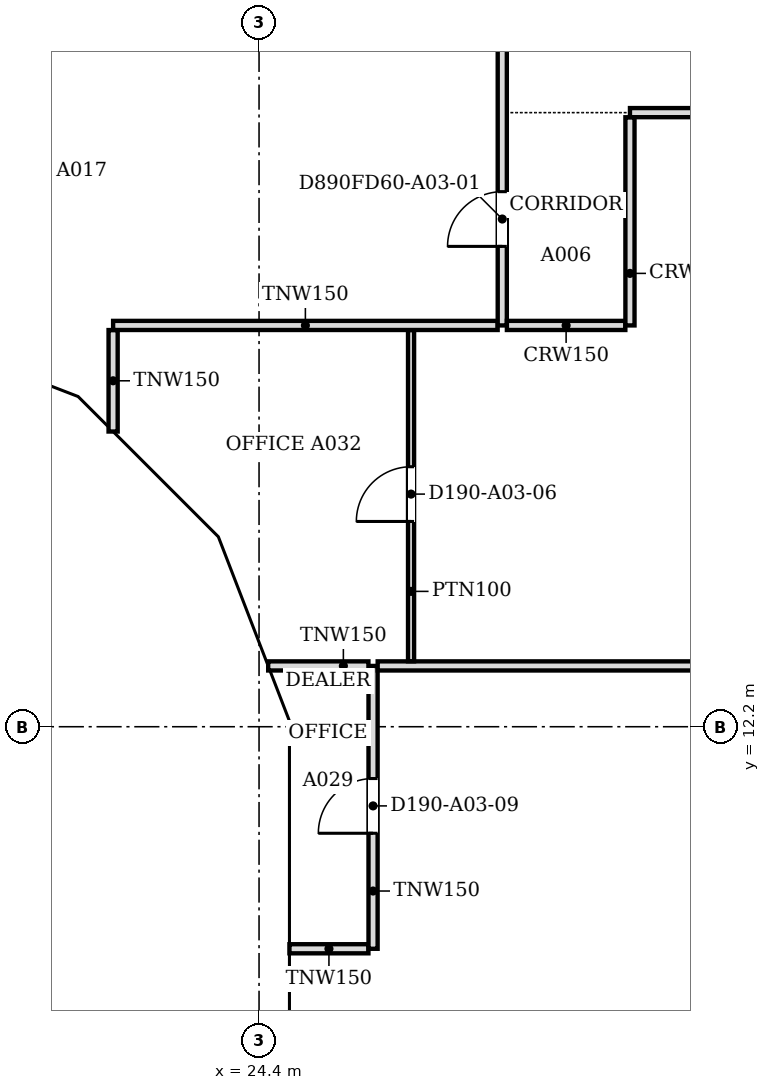
"""IFC4 building model, lengths in metres.
Left out: names, types, materials, properties, quantities, classifications, styles, units other than length and angle.
Written with IfcOpenShell. Run it as: python <this file> out.ifc"""

import sys

from ifc_helpers import new_model, si_unit, direction, frame, frame_2d, origin, place, context, subcontext, project, spatial, polyline, rectangle, outline, extrude, faceted_brep, source, transform, mapped, element, fill, save


model = new_model("IFC4")
c1 = context("Model", 3, precision=1e-05, world=origin(), true_north=direction((0.0, 1.0)))
c2 = subcontext(c1, "Body", "Model", "MODEL_VIEW")
j1 = project(units=[si_unit("LENGTHUNIT", "METRE"), si_unit("PLANEANGLEUNIT", "RADIAN")], contexts=[c1])
p1 = place(None, origin())
s1 = spatial("IfcSite", under=j1, at=p1, CompositionType="ELEMENT")
p2 = place(p1, origin())
s2 = spatial("IfcBuilding", under=s1, at=p2, CompositionType="ELEMENT")
p3 = place(p2, frame((0.0, 0.0, 41.0)))
s3 = spatial("IfcBuildingStorey", under=s2, at=p3, CompositionType="ELEMENT", Elevation=41.0)
m1 = source(origin(), c2, "Body", "Brep", [
    faceted_brep([(0.093, -0.25, 0.056), (3.143, -0.25, 3.736), (3.143, -0.25, 3.864), (0.093, -0.25, 7.544), (0.0, 0.25, 7.543), (0.047, 0.25, 7.6), (3.196, 0.25, 3.8), (0.047, 0.25, 0.0), (0.0, 0.25, 0.057), (3.196, -0.0, 3.8), (0.047, 0.0, 0.0), (0.047, 0.0, 7.6)], [[[0, 1, 2, 3]], [[4, 5, 6, 7, 8]], [[7, 6, 9, 1, 0, 10]], [[6, 5, 11, 3, 2, 9]], [[5, 4, 11]], [[8, 7, 10]], [[8, 10, 0, 3, 11, 4]], [[1, 9, 2]]]),
])
p4 = place(p3, frame((18.303, 18.567, -3.8), z_axis=(0.0, 0.0, 1.0), x_axis=(0.932978940178, -0.359930961693, 0.0)))
e1 = element("IfcWall", 1, at=p4, inside=s3, PredefinedType="SOLIDWALL", context=c2, shape_type="MappedRepresentation", body=[
    mapped(m1, transform((0.0, 0.0, 0.0), scale=1.0)),
])
m2 = source(origin(), c2, "Body", "SweptSolid", [
    extrude(outline(polyline([(0.247, 0.633), (2.871, 3.8), (0.247, 6.967), (0.247, 0.633)])), frame((0.0, 0.26, 0.0), z_axis=(0.0, -1.0, 0.0), x_axis=(1.0, 0.0, 0.0)), (0.0, 0.0, 1.0), 0.52),
])
p5 = place(p4, origin())
e2 = element("IfcOpeningElement", 2, at=p5, cuts=e1, PredefinedType="OPENING", context=c2, shape_type="MappedRepresentation", body=[
    mapped(m2, transform((0.0, 0.0, 0.0), scale=1.0)),
])
m3 = source(origin(), c2, "Body", "Brep", [
    faceted_brep([(3.103, -0.25, 7.536), (0.053, -0.25, 3.864), (0.053, -0.25, 3.736), (3.103, -0.25, 0.064), (0.0, 0.25, 3.8), (3.156, 0.25, 7.6), (3.209, 0.25, 7.536), (3.209, 0.25, 0.064), (3.156, 0.25, 0.0), (3.156, -0.0, 0.0), (3.156, -0.0, 7.6), (0.0, 0.0, 3.8)], [[[0, 1, 2, 3]], [[4, 5, 6, 7, 8]], [[8, 7, 9]], [[6, 5, 10]], [[5, 4, 11, 1, 0, 10]], [[4, 8, 9, 3, 2, 11]], [[11, 2, 1]], [[3, 9, 7, 6, 10, 0]]]),
])
p6 = place(p3, frame((21.285, 17.417, -3.8), z_axis=(0.0, 0.0, 1.0), x_axis=(0.707106781187, -0.707106781187, 0.0)))
e3 = element("IfcWall", 3, at=p6, inside=s3, PredefinedType="SOLIDWALL", context=c2, shape_type="MappedRepresentation", body=[
    mapped(m3, transform((0.0, 0.0, 0.0), scale=1.0)),
])
m4 = source(origin(), c2, "Body", "SweptSolid", [
    extrude(outline(polyline([(2.956, 6.968), (0.325, 3.8), (2.956, 0.632), (2.956, 6.968)])), frame((0.0, 0.26, 0.0), z_axis=(0.0, -1.0, 0.0), x_axis=(1.0, 0.0, 0.0)), (0.0, 0.0, 1.0), 0.52),
])
p7 = place(p6, origin())
e4 = element("IfcOpeningElement", 4, at=p7, cuts=e3, PredefinedType="OPENING", context=c2, shape_type="MappedRepresentation", body=[
    mapped(m4, transform((0.0, 0.0, 0.0), scale=1.0)),
])
m5 = source(origin(), c2, "Body", "Brep", [
    faceted_brep([(0.106, -0.25, 0.064), (3.156, -0.25, 3.744), (3.156, -0.25, 3.856), (0.106, -0.25, 7.536), (0.0, 0.25, 7.536), (0.053, 0.25, 7.6), (3.202, 0.25, 3.8), (0.053, 0.25, 0.0), (0.0, 0.25, 0.064), (3.202, -0.0, 3.8), (0.053, 0.0, 0.0), (0.053, 0.0, 7.6)], [[[0, 1, 2, 3]], [[4, 5, 6, 7, 8]], [[7, 6, 9, 1, 0, 10]], [[6, 5, 11, 3, 2, 9]], [[5, 4, 11]], [[8, 7, 10]], [[8, 10, 0, 3, 11, 4]], [[1, 9, 2]]]),
])
p8 = place(p3, frame((23.497, 15.234, -3.8), z_axis=(0.0, 0.0, 1.0), x_axis=(0.359913782069, -0.932985567668, 0.0)))
e5 = element("IfcWall", 5, at=p8, inside=s3, PredefinedType="SOLIDWALL", context=c2, shape_type="MappedRepresentation", body=[
    mapped(m5, transform((0.0, 0.0, 0.0), scale=1.0)),
])
m6 = source(origin(), c2, "Body", "SweptSolid", [
    extrude(outline(polyline([(0.253, 0.633), (2.878, 3.8), (0.253, 6.967), (0.253, 0.633)])), frame((0.0, 0.26, 0.0), z_axis=(0.0, -1.0, 0.0), x_axis=(1.0, 0.0, 0.0)), (0.0, 0.0, 1.0), 0.52),
])
p9 = place(p8, origin())
e6 = element("IfcOpeningElement", 6, at=p9, cuts=e5, PredefinedType="OPENING", context=c2, shape_type="MappedRepresentation", body=[
    mapped(m6, transform((0.0, 0.0, 0.0), scale=1.0)),
])
m7 = source(origin(), c2, "Body", "Brep", [
    faceted_brep([(3.096, -0.25, 0.0), (6.1, -0.25, 3.8), (3.096, -0.25, 7.6), (0.047, -0.25, 3.857), (0.047, -0.25, 3.743), (0.0, 0.25, 3.8), (3.096, 0.25, 7.6), (6.053, 0.25, 3.859), (6.053, 0.25, 3.741), (3.096, 0.25, 0.0), (6.1, -0.0, 3.8), (0.0, 0.0, 3.8)], [[[0, 1, 2, 3, 4]], [[5, 6, 7, 8, 9]], [[9, 8, 10, 1, 0]], [[7, 6, 2, 1, 10]], [[6, 5, 11, 3, 2]], [[5, 9, 0, 4, 11]], [[11, 4, 3]], [[10, 8, 7]]]),
])
p10 = place(p3, frame((24.65, 12.247, -3.8), z_axis=(0.0, 0.0, 1.0), x_axis=(0.0, -1.0, 0.0)))
e7 = element("IfcWall", 7, at=p10, inside=s3, PredefinedType="SOLIDWALL", context=c2, shape_type="MappedRepresentation", body=[
    mapped(m7, transform((0.0, 0.0, 0.0), scale=1.0)),
])
m8 = source(origin(), c2, "Body", "SweptSolid", [
    extrude(outline(polyline([(3.094, 0.399), (5.781, 3.8), (3.094, 7.201), (0.323, 3.8), (3.094, 0.399)])), frame((0.0, 0.26, 0.0), z_axis=(0.0, -1.0, 0.0), x_axis=(1.0, 0.0, 0.0)), (0.0, 0.0, 1.0), 0.52),
])
p11 = place(p10, origin())
e8 = element("IfcOpeningElement", 8, at=p11, cuts=e7, PredefinedType="OPENING", context=c2, shape_type="MappedRepresentation", body=[
    mapped(m8, transform((0.0, 0.0, 0.0), scale=1.0)),
])
p12 = place(p2, frame((0.0, 0.0, 44.8)))
s4 = spatial("IfcBuildingStorey", under=s2, at=p12, CompositionType="ELEMENT", Elevation=44.8)
m9 = source(origin(), c2, "Body", "Brep", [
    faceted_brep([(3.096, -0.25, 7.536), (0.047, -0.25, 3.856), (0.047, -0.25, 3.744), (3.096, -0.25, 0.064), (0.0, 0.25, 3.8), (3.149, 0.25, 7.6), (3.202, 0.25, 7.536), (3.202, 0.25, 0.064), (3.149, 0.25, 0.0), (3.149, -0.0, 0.0), (3.149, -0.0, 7.6), (0.0, 0.0, 3.8)], [[[0, 1, 2, 3]], [[4, 5, 6, 7, 8]], [[8, 7, 9]], [[6, 5, 10]], [[5, 4, 11, 1, 0, 10]], [[4, 8, 9, 3, 2, 11]], [[11, 2, 1]], [[3, 9, 7, 6, 10, 0]]]),
])
p13 = place(p12, frame((18.346, 18.55, -3.8), z_axis=(0.0, 0.0, 1.0), x_axis=(0.932985567668, -0.359913782069, 0.0)))
e9 = element("IfcWall", 9, at=p13, inside=s4, PredefinedType="SOLIDWALL", context=c2, shape_type="MappedRepresentation", body=[
    mapped(m9, transform((0.0, 0.0, 0.0), scale=1.0)),
])
m10 = source(origin(), c2, "Body", "SweptSolid", [
    extrude(outline(polyline([(2.949, 6.967), (0.325, 3.8), (2.949, 0.633), (2.949, 6.967)])), frame((0.0, 0.26, 0.0), z_axis=(0.0, -1.0, 0.0), x_axis=(1.0, 0.0, 0.0)), (0.0, 0.0, 1.0), 0.52),
])
p14 = place(p13, origin())
e10 = element("IfcOpeningElement", 10, at=p14, cuts=e9, PredefinedType="OPENING", context=c2, shape_type="MappedRepresentation", body=[
    mapped(m10, transform((0.0, 0.0, 0.0), scale=1.0)),
])
m11 = source(origin(), c2, "Body", "Brep", [
    faceted_brep([(0.106, -0.25, 0.064), (3.156, -0.25, 3.736), (3.156, -0.25, 3.864), (0.106, -0.25, 7.536), (0.0, 0.25, 7.536), (0.053, 0.25, 7.6), (3.209, 0.25, 3.8), (0.053, 0.25, 0.0), (0.0, 0.25, 0.064), (3.209, -0.0, 3.8), (0.053, 0.0, 0.0), (0.053, 0.0, 7.6)], [[[0, 1, 2, 3]], [[4, 5, 6, 7, 8]], [[7, 6, 9, 1, 0, 10]], [[6, 5, 11, 3, 2, 9]], [[5, 4, 11]], [[8, 7, 10]], [[8, 10, 0, 3, 11, 4]], [[1, 9, 2]]]),
])
p15 = place(p12, frame((21.248, 17.454, -3.8), z_axis=(0.0, 0.0, 1.0), x_axis=(0.707106781187, -0.707106781187, 0.0)))
e11 = element("IfcWall", 11, at=p15, inside=s4, PredefinedType="SOLIDWALL", context=c2, shape_type="MappedRepresentation", body=[
    mapped(m11, transform((0.0, 0.0, 0.0), scale=1.0)),
])
m12 = source(origin(), c2, "Body", "SweptSolid", [
    extrude(outline(polyline([(0.253, 0.632), (2.884, 3.8), (0.253, 6.968), (0.253, 0.632)])), frame((0.0, 0.26, 0.0), z_axis=(0.0, -1.0, 0.0), x_axis=(1.0, 0.0, 0.0)), (0.0, 0.0, 1.0), 0.52),
])
p16 = place(p15, origin())
e12 = element("IfcOpeningElement", 12, at=p16, cuts=e11, PredefinedType="OPENING", context=c2, shape_type="MappedRepresentation", body=[
    mapped(m12, transform((0.0, 0.0, 0.0), scale=1.0)),
])
m13 = source(origin(), c2, "Body", "Brep", [
    faceted_brep([(3.103, -0.25, 7.544), (0.053, -0.25, 3.864), (0.053, -0.25, 3.736), (3.103, -0.25, 0.056), (0.0, 0.25, 3.8), (3.149, 0.25, 7.6), (3.196, 0.25, 7.543), (3.196, 0.25, 0.057), (3.149, 0.25, 0.0), (3.149, -0.0, 0.0), (3.149, -0.0, 7.6), (0.0, 0.0, 3.8)], [[[0, 1, 2, 3]], [[4, 5, 6, 7, 8]], [[8, 7, 9]], [[6, 5, 10]], [[5, 4, 11, 1, 0, 10]], [[4, 8, 9, 3, 2, 11]], [[11, 2, 1]], [[3, 9, 7, 6, 10, 0]]]),
])
p17 = place(p12, frame((23.517, 15.185, -3.8), z_axis=(0.0, 0.0, 1.0), x_axis=(0.359864468756, -0.933004589553, 0.0)))
e13 = element("IfcWall", 13, at=p17, inside=s4, PredefinedType="SOLIDWALL", context=c2, shape_type="MappedRepresentation", body=[
    mapped(m13, transform((0.0, 0.0, 0.0), scale=1.0)),
])
p18 = place(p17, origin())
e14 = element("IfcOpeningElement", 14, at=p18, cuts=e13, PredefinedType="OPENING", context=c2, shape_type="MappedRepresentation", body=[
    mapped(m10, transform((0.0, 0.0, 0.0), scale=1.0)),
])
m14 = source(origin(), c2, "Body", "Brep", [
    faceted_brep([(0.093, -0.25, 0.057), (3.143, -0.25, 3.8), (0.093, -0.25, 7.543), (0.0, 0.25, 7.544), (0.047, 0.25, 7.6), (3.143, 0.25, 3.8), (0.047, 0.25, 0.0), (0.0, 0.25, 0.056), (0.047, 0.0, 0.0), (0.047, 0.0, 7.6)], [[[0, 1, 2]], [[3, 4, 5, 6, 7]], [[6, 5, 1, 0, 8]], [[5, 4, 9, 2, 1]], [[4, 3, 9]], [[7, 6, 8]], [[7, 8, 0, 2, 9, 3]]]),
])
p19 = place(p12, frame((24.65, 12.293, -3.8), z_axis=(0.0, 0.0, 1.0), x_axis=(0.0, -1.0, 0.0)))
e15 = element("IfcWall", 15, at=p19, inside=s4, PredefinedType="SOLIDWALL", context=c2, shape_type="MappedRepresentation", body=[
    mapped(m14, transform((0.0, 0.0, 0.0), scale=1.0)),
])
m15 = source(origin(), c2, "Body", "SweptSolid", [
    extrude(outline(polyline([(0.247, 0.641), (2.821, 3.8), (0.247, 6.959), (0.247, 0.641)])), frame((0.0, 0.26, 0.0), z_axis=(0.0, -1.0, 0.0), x_axis=(1.0, 0.0, 0.0)), (0.0, 0.0, 1.0), 0.52),
])
p20 = place(p19, origin())
e16 = element("IfcOpeningElement", 16, at=p20, cuts=e15, PredefinedType="OPENING", context=c2, shape_type="MappedRepresentation", body=[
    mapped(m15, transform((0.0, 0.0, 0.0), scale=1.0)),
])
m16 = source(origin(), c2, "Body", "Brep", [
    faceted_brep([(3.003, -0.25, 0.0), (3.05, -0.25, 0.06), (3.05, -0.25, 7.54), (3.003, -0.25, 7.6), (0.0, -0.25, 3.8), (0.0, 0.25, 3.8), (2.957, 0.25, 7.541), (2.957, 0.25, 0.059), (3.003, 0.0, 0.0), (3.003, 0.0, 7.6)], [[[0, 1, 2, 3, 4]], [[5, 6, 7]], [[1, 0, 8]], [[9, 3, 2]], [[6, 5, 4, 3, 9]], [[5, 7, 8, 0, 4]], [[1, 8, 7, 6, 9, 2]]]),
])
p21 = place(p12, frame((24.65, 9.15, -3.8), z_axis=(0.0, 0.0, 1.0), x_axis=(0.0, -1.0, 0.0)))
e17 = element("IfcWall", 17, at=p21, inside=s4, PredefinedType="SOLIDWALL", context=c2, shape_type="MappedRepresentation", body=[
    mapped(m16, transform((0.0, 0.0, 0.0), scale=1.0)),
])
m17 = source(origin(), c2, "Body", "SweptSolid", [
    extrude(outline(polyline([(2.803, 6.944), (0.319, 3.8), (2.803, 0.656), (2.803, 6.944)])), frame((0.0, 0.26, 0.0), z_axis=(0.0, -1.0, 0.0), x_axis=(1.0, 0.0, 0.0)), (0.0, 0.0, 1.0), 0.52),
])
p22 = place(p21, origin())
e18 = element("IfcOpeningElement", 18, at=p22, cuts=e17, PredefinedType="OPENING", context=c2, shape_type="MappedRepresentation", body=[
    mapped(m17, transform((0.0, 0.0, 0.0), scale=1.0)),
])
p23 = place(p3, frame((24.9, 8.548, 0.0), z_axis=(0.0, 0.0, 1.0), x_axis=(1.0, 0.0, 0.0)))
e19 = element("IfcWall", 19, at=p23, inside=s3, PredefinedType="PARTITIONING", context=c2, shape_type="SweptSolid", body=[
    extrude(rectangle(XDim=1.299, YDim=0.15, at=frame_2d((0.649, 0.0))), origin(), (0.0, 0.0, 1.0), 3.067),
])
p24 = place(p3, frame((26.275, 8.548, 0.0), z_axis=(0.0, 0.0, 1.0), x_axis=(0.0, 1.0, 0.0)))
e20 = element("IfcWall", 20, at=p24, inside=s3, PredefinedType="PARTITIONING", context=c2, shape_type="SweptSolid", body=[
    extrude(rectangle(XDim=4.652, YDim=0.15, at=frame_2d((2.326, 0.0))), origin(), (0.0, 0.0, 1.0), 3.067),
])
m18 = source(origin(), c2, "Body", "SweptSolid", [
    extrude(rectangle(XDim=0.9, YDim=2.1, at=frame_2d((0.45, 1.05))), frame((0.0, 0.085, 0.0), z_axis=(0.0, -1.0, 0.0), x_axis=(1.0, 0.0, 0.0)), (0.0, 0.0, 1.0), 0.17),
])
p25 = place(p24, frame((1.9, 0.0, 0.0)))
e21 = element("IfcOpeningElement", 21, at=p25, cuts=e20, PredefinedType="OPENING", context=c2, shape_type="MappedRepresentation", body=[
    mapped(m18, transform((0.0, 0.0, 0.0), scale=1.0)),
])
p26 = place(p3, frame((24.55, 13.2, 0.0), z_axis=(0.0, 0.0, 1.0), x_axis=(1.0, 0.0, 0.0)))
e22 = element("IfcWall", 22, at=p26, inside=s3, PredefinedType="PARTITIONING", context=c2, shape_type="SweptSolid", body=[
    extrude(rectangle(XDim=1.649, YDim=0.15, at=frame_2d((0.824, 0.0))), origin(), (0.0, 0.0, 1.0), 3.067),
])
p27 = place(p3, frame((26.351, 13.2, 0.0), z_axis=(0.0, 0.0, 1.0), x_axis=(1.0, 0.0, 0.0)))
e23 = element("IfcWall", 23, at=p27, inside=s3, PredefinedType="PARTITIONING", context=c2, shape_type="SweptSolid", body=[
    extrude(rectangle(XDim=18.573, YDim=0.15, at=frame_2d((9.287, 0.0))), origin(), (0.0, 0.0, 1.0), 3.067),
])
p28 = place(p3, frame((26.9, 13.276, 0.0), z_axis=(0.0, 0.0, 1.0), x_axis=(0.0, 1.0, 0.0)))
e24 = element("IfcWall", 24, at=p28, inside=s3, PredefinedType="PARTITIONING", context=c2, shape_type="SweptSolid", body=[
    extrude(rectangle(XDim=5.448, YDim=0.1, at=frame_2d((2.724, 0.0))), origin(), (0.0, 0.0, 1.0), 3.067),
])
m19 = source(origin(), c2, "Body", "SweptSolid", [
    extrude(rectangle(XDim=0.9, YDim=2.1, at=frame_2d((0.45, 1.05))), frame((0.0, 0.06, 0.0), z_axis=(0.0, -1.0, 0.0), x_axis=(1.0, 0.0, 0.0)), (0.0, 0.0, 1.0), 0.12),
])
p29 = place(p28, frame((2.3, 0.0, 0.0)))
e25 = element("IfcOpeningElement", 25, at=p29, cuts=e24, PredefinedType="OPENING", context=c2, shape_type="MappedRepresentation", body=[
    mapped(m19, transform((0.0, 0.0, 0.0), scale=1.0)),
])
p30 = place(p3, frame((22.0, 17.055, 0.0), z_axis=(0.0, 0.0, 1.0), x_axis=(0.0, 1.0, 0.0)))
e26 = element("IfcWall", 26, at=p30, inside=s3, PredefinedType="PARTITIONING", context=c2, shape_type="SweptSolid", body=[
    extrude(rectangle(XDim=1.669, YDim=0.15, at=frame_2d((0.834, 0.0))), origin(), (0.0, 0.0, 1.0), 3.067),
])
p31 = place(p3, frame((22.0, 18.8, 0.0), z_axis=(0.0, 0.0, 1.0), x_axis=(1.0, 0.0, 0.0)))
e27 = element("IfcWall", 27, at=p31, inside=s3, PredefinedType="PARTITIONING", context=c2, shape_type="SweptSolid", body=[
    extrude(rectangle(XDim=6.324, YDim=0.15, at=frame_2d((3.162, 0.0))), origin(), (0.0, 0.0, 1.0), 3.067),
])
p32 = place(p3, frame((28.4, 18.8, 0.0), z_axis=(0.0, 0.0, 1.0), x_axis=(0.0, 1.0, 0.0)))
e28 = element("IfcWall", 28, at=p32, inside=s3, PredefinedType="PARTITIONING", context=c2, shape_type="SweptSolid", body=[
    extrude(rectangle(XDim=26.824, YDim=0.15, at=frame_2d((13.412, 0.0))), origin(), (0.0, 0.0, 1.0), 3.067),
])
p33 = place(p32, frame((1.3, 0.0, 0.0)))
e29 = element("IfcOpeningElement", 29, at=p33, cuts=e28, PredefinedType="OPENING", context=c2, shape_type="MappedRepresentation", body=[
    mapped(m18, transform((0.0, 0.0, 0.0), scale=1.0)),
])
p34 = place(p32, frame((14.301, 0.0, 0.0)))
e30 = element("IfcOpeningElement", 30, at=p34, cuts=e28, PredefinedType="OPENING", context=c2, shape_type="MappedRepresentation", body=[
    mapped(m18, transform((0.0, 0.0, 0.0), scale=1.0)),
])
p35 = place(p32, frame((8.2, 0.0, 0.0)))
e31 = element("IfcOpeningElement", 31, at=p35, cuts=e28, PredefinedType="OPENING", context=c2, shape_type="MappedRepresentation", body=[
    mapped(m18, transform((0.0, 0.0, 0.0), scale=1.0)),
])
p36 = place(p32, frame((21.9, 0.0, 0.0)))
e32 = element("IfcOpeningElement", 32, at=p36, cuts=e28, PredefinedType="OPENING", context=c2, shape_type="MappedRepresentation", body=[
    mapped(m18, transform((0.0, 0.0, 0.0), scale=1.0)),
])
p37 = place(p3, frame((28.476, 18.8, 0.0), z_axis=(0.0, 0.0, 1.0), x_axis=(1.0, 0.0, 0.0)))
e33 = element("IfcWall", 33, at=p37, inside=s3, PredefinedType="PARTITIONING", context=c2, shape_type="SweptSolid", body=[
    extrude(rectangle(XDim=1.948, YDim=0.15, at=frame_2d((0.974, 0.0))), origin(), (0.0, 0.0, 1.0), 3.067),
])
p38 = place(p3, frame((30.5, 18.8, 0.0), z_axis=(0.0, 0.0, 1.0), x_axis=(0.0, 1.0, 0.0)))
e34 = element("IfcWall", 34, at=p38, inside=s3, PredefinedType="PARTITIONING", context=c2, shape_type="SweptSolid", body=[
    extrude(rectangle(XDim=3.424, YDim=0.15, at=frame_2d((1.712, 0.0))), origin(), (0.0, 0.0, 1.0), 3.067),
])
p39 = place(p3, frame((30.5, 22.3, 0.0), z_axis=(0.0, 0.0, 1.0), x_axis=(1.0, 0.0, 0.0)))
e35 = element("IfcWall", 35, at=p39, inside=s3, PredefinedType="PARTITIONING", context=c2, shape_type="SweptSolid", body=[
    extrude(rectangle(XDim=14.5, YDim=0.15, at=frame_2d((7.25, 0.0))), origin(), (0.0, 0.0, 1.0), 3.067),
])
m20 = source(origin(), c2, "Body", "SweptSolid", [
    extrude(rectangle(XDim=0.9, YDim=2.1, at=frame_2d((0.45, 1.05))), frame((0.0, 0.025, 0.0), z_axis=(0.0, -1.0, 0.0), x_axis=(1.0, 0.0, 0.0)), (0.0, 0.0, 1.0), 0.05),
])
p40 = place(p33, origin())
e36 = element("IfcDoor", 36, at=p40, inside=s3, OperationType="SINGLE_SWING_LEFT", PredefinedType="DOOR", context=c2, shape_type="MappedRepresentation", body=[
    mapped(m20, transform((0.0, 0.0, 0.0), scale=1.0)),
])
fill(e29, e36)
p41 = place(p29, origin())
e37 = element("IfcDoor", 37, at=p41, inside=s3, OperationType="SINGLE_SWING_LEFT", PredefinedType="DOOR", context=c2, shape_type="MappedRepresentation", body=[
    mapped(m20, transform((0.0, 0.0, 0.0), scale=1.0)),
])
fill(e25, e37)
p42 = place(p25, origin())
e38 = element("IfcDoor", 38, at=p42, inside=s3, OperationType="SINGLE_SWING_LEFT", PredefinedType="DOOR", context=c2, shape_type="MappedRepresentation", body=[
    mapped(m20, transform((0.0, 0.0, 0.0), scale=1.0)),
])
fill(e21, e38)
save(model, sys.argv[1])
